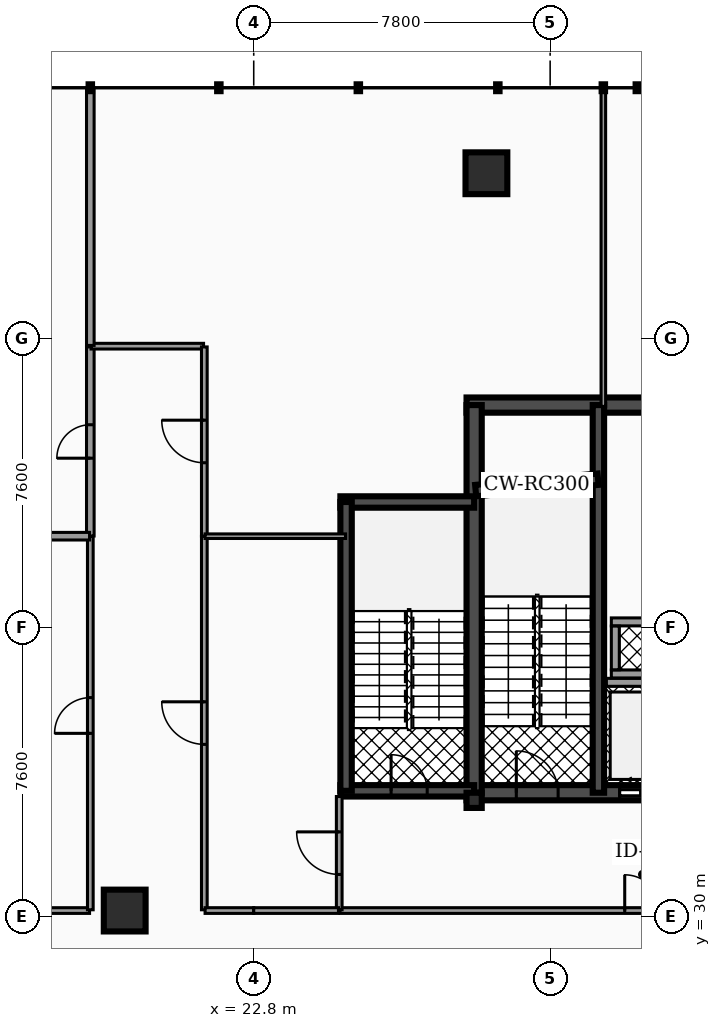
"""IFC4 building model, lengths in metres.
Left out: names, types, materials, properties, quantities, classifications, styles, units other than length and angle.
Written with IfcOpenShell. Run it as: python <this file> out.ifc"""

import sys

from ifc_helpers import new_model, si_unit, direction, frame, frame_2d, origin, origin_2d, place, context, subcontext, project, spatial, rectangle, hollow_rectangle, extrude, element, fill, save


model = new_model("IFC4")
c1 = context("Model", 3, precision=1e-05, world=origin(), true_north=direction((0.0, 1.0)))
c2 = subcontext(c1, "Body", "Model", "MODEL_VIEW")
j1 = project(units=[si_unit("LENGTHUNIT", "METRE"), si_unit("PLANEANGLEUNIT", "RADIAN")], contexts=[c1])
p1 = place(None, origin())
s1 = spatial("IfcSite", under=j1, at=p1, CompositionType="ELEMENT")
p2 = place(p1, origin())
s2 = spatial("IfcBuilding", under=s1, at=p2, CompositionType="ELEMENT")
p3 = place(p2, frame((0.0, 0.0, 13.94)))
s3 = spatial("IfcBuildingStorey", under=s2, at=p3, CompositionType="ELEMENT", Elevation=13.94)
p4 = place(p3, frame((28.4, 43.45, 0.0), z_axis=(0.0, 0.0, 1.0), x_axis=(1.0, 0.0, 0.0)))
e1 = element("IfcWall", 1, at=p4, inside=s3, PredefinedType="SHEAR", context=c2, shape_type="SweptSolid", body=[
    extrude(rectangle(XDim=20.06, YDim=0.4, at=frame_2d((10.03, 0.0))), origin(), (0.0, 0.0, 1.0), 4.14),
])
p5 = place(p3, frame((28.4, 33.25, 0.0), z_axis=(0.0, 0.0, 1.0), x_axis=(1.0, 0.0, 0.0)))
e2 = element("IfcWall", 2, at=p5, inside=s3, PredefinedType="SHEAR", context=c2, shape_type="SweptSolid", body=[
    extrude(rectangle(XDim=20.06, YDim=0.4, at=frame_2d((10.03, 0.0))), origin(), (0.0, 0.0, 1.0), 4.14),
])
p6 = place(p5, frame((4.03, 0.0, 0.0)))
e3 = element("IfcOpeningElement", 3, at=p6, cuts=e2, PredefinedType="OPENING", context=c2, shape_type="SweptSolid", body=[
    extrude(rectangle(XDim=1.1, YDim=2.15, at=frame_2d((0.55, 1.075))), frame((0.0, 0.21, 0.0), z_axis=(0.0, -1.0, 0.0), x_axis=(1.0, 0.0, 0.0)), (0.0, 0.0, 1.0), 0.42),
])
p7 = place(p5, frame((14.87, 0.0, 0.0)))
e4 = element("IfcOpeningElement", 4, at=p7, cuts=e2, PredefinedType="OPENING", context=c2, shape_type="SweptSolid", body=[
    extrude(rectangle(XDim=1.1, YDim=2.15, at=frame_2d((0.55, 1.075))), frame((0.0, 0.21, 0.0), z_axis=(0.0, -1.0, 0.0), x_axis=(1.0, 0.0, 0.0)), (0.0, 0.0, 1.0), 0.42),
])
p8 = place(p5, frame((1.31, 0.0, 0.0)))
e5 = element("IfcOpeningElement", 5, at=p8, cuts=e2, PredefinedType="OPENING", context=c2, shape_type="SweptSolid", body=[
    extrude(rectangle(XDim=1.1, YDim=2.2, at=frame_2d((0.55, 1.1))), frame((0.0, 0.21, 0.0), z_axis=(0.0, -1.0, 0.0), x_axis=(1.0, 0.0, 0.0)), (0.0, 0.0, 1.0), 0.42),
])
p9 = place(p5, frame((9.44, 0.0, 0.0)))
e6 = element("IfcOpeningElement", 6, at=p9, cuts=e2, PredefinedType="OPENING", context=c2, shape_type="SweptSolid", body=[
    extrude(rectangle(XDim=1.12, YDim=2.05, at=frame_2d((0.56, 1.025))), frame((0.0, 0.21, 0.0), z_axis=(0.0, -1.0, 0.0), x_axis=(1.0, 0.0, 0.0)), (0.0, 0.0, 1.0), 0.42),
])
p10 = place(p5, frame((17.65, 0.0, 0.0)))
e7 = element("IfcOpeningElement", 7, at=p10, cuts=e2, PredefinedType="OPENING", context=c2, shape_type="SweptSolid", body=[
    extrude(rectangle(XDim=1.1, YDim=2.2, at=frame_2d((0.55, 1.1))), frame((0.0, 0.21, 0.0), z_axis=(0.0, -1.0, 0.0), x_axis=(1.0, 0.0, 0.0)), (0.0, 0.0, 1.0), 0.42),
])
p11 = place(p3, frame((28.6, 33.25, 0.0), z_axis=(0.0, 0.0, 1.0), x_axis=(0.0, 1.0, 0.0)))
e8 = element("IfcWall", 8, at=p11, inside=s3, PredefinedType="SHEAR", context=c2, shape_type="SweptSolid", body=[
    extrude(rectangle(XDim=10.2, YDim=0.4, at=frame_2d((5.1, 0.0))), origin(), (0.0, 0.0, 1.0), 4.14),
])
p12 = place(p3, frame((31.87, 33.25, 0.0), z_axis=(0.0, 0.0, 1.0), x_axis=(0.0, 1.0, 0.0)))
e9 = element("IfcWall", 9, at=p12, inside=s3, PredefinedType="SHEAR", context=c2, shape_type="SweptSolid", body=[
    extrude(rectangle(XDim=10.2, YDim=0.3, at=frame_2d((5.1, 0.0))), origin(), (0.0, 0.0, 1.0), 4.14),
])
p13 = place(p3, frame((28.64, 41.2, 0.0), z_axis=(0.0, 0.0, 1.0), x_axis=(0.995687118776, 0.092774789157, 0.0)))
e10 = element("IfcWall", 10, at=p13, inside=s3, PredefinedType="SHEAR", context=c2, shape_type="SweptSolid", body=[
    extrude(rectangle(XDim=3.234, YDim=0.3, at=frame_2d((1.617, 0.0))), origin(), (0.0, 0.0, 1.0), 4.14),
])
p14 = place(p3, frame((25.08, 40.9, 0.0), z_axis=(0.0, 0.0, 1.0), x_axis=(1.0, 0.0, 0.0)))
e11 = element("IfcWall", 11, at=p14, inside=s3, PredefinedType="SHEAR", context=c2, shape_type="SweptSolid", body=[
    extrude(rectangle(XDim=3.52, YDim=0.3, at=frame_2d((1.76, 0.0))), origin(), (0.0, 0.0, 1.0), 4.14),
])
p15 = place(p3, frame((25.08, 33.3, 0.0), z_axis=(0.0, 0.0, 1.0), x_axis=(1.0, 0.0, 0.0)))
e12 = element("IfcWall", 12, at=p15, inside=s3, PredefinedType="SHEAR", context=c2, shape_type="SweptSolid", body=[
    extrude(rectangle(XDim=3.52, YDim=0.3, at=frame_2d((1.76, 0.0))), origin(), (0.0, 0.0, 1.0), 4.14),
])
p16 = place(p15, frame((1.335, 0.0, 0.0)))
e13 = element("IfcOpeningElement", 13, at=p16, cuts=e12, PredefinedType="OPENING", context=c2, shape_type="SweptSolid", body=[
    extrude(rectangle(XDim=0.95, YDim=2.2, at=frame_2d((0.475, 1.1))), frame((0.0, 0.16, 0.0), z_axis=(0.0, -1.0, 0.0), x_axis=(1.0, 0.0, 0.0)), (0.0, 0.0, 1.0), 0.32),
])
p17 = place(p3, frame((25.23, 33.3, 0.0), z_axis=(0.0, 0.0, 1.0), x_axis=(0.0, 1.0, 0.0)))
e14 = element("IfcWall", 14, at=p17, inside=s3, PredefinedType="SHEAR", context=c2, shape_type="SweptSolid", body=[
    extrude(rectangle(XDim=7.6, YDim=0.3, at=frame_2d((3.8, 0.0))), origin(), (0.0, 0.0, 1.0), 4.14),
])
for number, where, z_axis, x_axis in (
    (15, (28.923, 49.55, 0.0), (0.0, 0.0, 1.0), (1.0, 0.0, 0.0)),
    (16, (19.405, 30.15, 0.0), (0.0, 0.0, 1.0), (1.0, 0.0, 0.0)),
):
    element("IfcColumn", number, at=place(p3, frame(where, z_axis=z_axis, x_axis=x_axis)), inside=s3, PredefinedType="COLUMN", context=c2, shape_type="SweptSolid", body=[
        extrude(hollow_rectangle(XDim=1.1, YDim=1.1, WallThickness=0.055, at=origin_2d()), origin(), (0.0, 0.0, 1.0), 4.14),
    ])
p18 = place(p3, frame((28.6, 33.05, 0.0), z_axis=(0.0, 0.0, 1.0), x_axis=(1.0, 0.0, 0.0)))
e17 = element("IfcColumn", 17, at=p18, inside=s3, PredefinedType="PILASTER", context=c2, shape_type="SweptSolid", body=[
    extrude(hollow_rectangle(XDim=0.4, YDim=0.4, WallThickness=0.02, at=origin_2d()), origin(), (0.0, 0.0, 1.0), 4.14),
])
p19 = place(p3, frame((32.08, 36.155, 0.0), z_axis=(0.0, 0.0, 1.0), x_axis=(1.0, 0.0, 0.0)))
e18 = element("IfcWall", 18, at=p19, inside=s3, PredefinedType="SOLIDWALL", context=c2, shape_type="SweptSolid", body=[
    extrude(rectangle(XDim=1.8, YDim=0.21, at=frame_2d((0.9, 0.0))), origin(), (0.0, 0.0, 1.0), 3.112),
])
for number, where, z_axis, x_axis in (
    (19, (32.21, 36.375, 0.0), (0.0, 0.0, 1.0), (1.0, 0.0, 0.0)),
    (20, (32.21, 37.745, 0.0), (0.0, 0.0, 1.0), (1.0, 0.0, 0.0)),
):
    element("IfcWall", number, at=place(p3, frame(where, z_axis=z_axis, x_axis=x_axis)), inside=s3, PredefinedType="SOLIDWALL", context=c2, shape_type="SweptSolid", body=[
        extrude(rectangle(XDim=1.6, YDim=0.21, at=frame_2d((0.8, 0.0))), origin(), (0.0, 0.0, 1.0), 4.14),
    ])
p20 = place(p3, frame((32.315, 36.485, 0.0), z_axis=(0.0, 0.0, 1.0), x_axis=(0.0, 1.0, 0.0)))
e21 = element("IfcWall", 21, at=p20, inside=s3, PredefinedType="SOLIDWALL", context=c2, shape_type="SweptSolid", body=[
    extrude(rectangle(XDim=1.15, YDim=0.21, at=frame_2d((0.575, 0.0))), origin(), (0.0, 0.0, 1.0), 4.14),
])
p21 = place(p3, frame((25.07, 30.15, 0.0), z_axis=(0.0, 0.0, 1.0), x_axis=(1.0, 0.0, 0.0)))
e22 = element("IfcWall", 22, at=p21, inside=s3, PredefinedType="PARTITIONING", context=c2, shape_type="SweptSolid", body=[
    extrude(rectangle(XDim=20.325, YDim=0.15, at=frame_2d((10.163, 0.0))), origin(), (0.0, 0.0, 1.0), 3.097),
])
p22 = place(p21, frame((7.492, 0.0, 0.0)))
e23 = element("IfcOpeningElement", 23, at=p22, cuts=e22, PredefinedType="OPENING", context=c2, shape_type="SweptSolid", body=[
    extrude(rectangle(XDim=0.94, YDim=2.05, at=frame_2d((0.47, 1.025))), frame((0.0, 0.085, 0.0), z_axis=(0.0, -1.0, 0.0), x_axis=(1.0, 0.0, 0.0)), (0.0, 0.0, 1.0), 0.17),
])
p23 = place(p3, frame((25.05, 30.17, 0.0), z_axis=(0.0, 0.0, 1.0), x_axis=(0.0, 1.0, 0.0)))
e24 = element("IfcWall", 24, at=p23, inside=s3, PredefinedType="PARTITIONING", context=c2, shape_type="SweptSolid", body=[
    extrude(rectangle(XDim=2.98, YDim=0.15, at=frame_2d((1.49, 0.0))), origin(), (0.0, 0.0, 1.0), 3.097),
])
p24 = place(p23, frame((0.93, 0.0, 0.0)))
e25 = element("IfcOpeningElement", 25, at=p24, cuts=e24, PredefinedType="OPENING", context=c2, shape_type="SweptSolid", body=[
    extrude(rectangle(XDim=1.12, YDim=2.05, at=frame_2d((0.56, 1.025))), frame((0.0, 0.085, 0.0), z_axis=(0.0, -1.0, 0.0), x_axis=(1.0, 0.0, 0.0)), (0.0, 0.0, 1.0), 0.17),
])
p25 = place(p3, frame((11.52, 30.15, 0.0), z_axis=(0.0, 0.0, 1.0), x_axis=(1.0, 0.0, 0.0)))
e26 = element("IfcWall", 26, at=p25, inside=s3, PredefinedType="PARTITIONING", context=c2, shape_type="SweptSolid", body=[
    extrude(rectangle(XDim=6.96, YDim=0.15, at=frame_2d((3.48, 0.0))), origin(), (0.0, 0.0, 1.0), 3.097),
])
p26 = place(p3, frame((18.5, 30.17, 0.0), z_axis=(0.0, 0.0, 1.0), x_axis=(0.0, 1.0, 0.0)))
e27 = element("IfcWall", 27, at=p26, inside=s3, PredefinedType="PARTITIONING", context=c2, shape_type="SweptSolid", body=[
    extrude(rectangle(XDim=9.825, YDim=0.15, at=frame_2d((4.913, 0.0))), origin(), (0.0, 0.0, 1.0), 3.097),
])
p27 = place(p26, frame((4.643, 0.0, 0.0)))
e28 = element("IfcOpeningElement", 28, at=p27, cuts=e27, PredefinedType="OPENING", context=c2, shape_type="SweptSolid", body=[
    extrude(rectangle(XDim=0.94, YDim=2.05, at=frame_2d((0.47, 1.025))), frame((0.0, 0.085, 0.0), z_axis=(0.0, -1.0, 0.0), x_axis=(1.0, 0.0, 0.0)), (0.0, 0.0, 1.0), 0.17),
])
p28 = place(p3, frame((21.5, 30.17, 0.0), z_axis=(0.0, 0.0, 1.0), x_axis=(0.0, 1.0, 0.0)))
e29 = element("IfcWall", 29, at=p28, inside=s3, PredefinedType="PARTITIONING", context=c2, shape_type="SweptSolid", body=[
    extrude(rectangle(XDim=9.825, YDim=0.15, at=frame_2d((4.913, 0.0))), origin(), (0.0, 0.0, 1.0), 3.097),
])
p29 = place(p28, frame((4.353, 0.0, 0.0)))
e30 = element("IfcOpeningElement", 30, at=p29, cuts=e29, PredefinedType="OPENING", context=c2, shape_type="SweptSolid", body=[
    extrude(rectangle(XDim=1.12, YDim=2.05, at=frame_2d((0.56, 1.025))), frame((0.0, 0.085, 0.0), z_axis=(0.0, -1.0, 0.0), x_axis=(1.0, 0.0, 0.0)), (0.0, 0.0, 1.0), 0.17),
])
p30 = place(p3, frame((21.52, 30.15, 0.0), z_axis=(0.0, 0.0, 1.0), x_axis=(1.0, 0.0, 0.0)))
e31 = element("IfcWall", 31, at=p30, inside=s3, PredefinedType="PARTITIONING", context=c2, shape_type="SweptSolid", body=[
    extrude(rectangle(XDim=1.28, YDim=0.15, at=frame_2d((0.64, 0.0))), origin(), (0.0, 0.0, 1.0), 3.097),
])
p31 = place(p3, frame((22.8, 30.15, 0.0), z_axis=(0.0, 0.0, 1.0), x_axis=(1.0, 0.0, 0.0)))
e32 = element("IfcWall", 32, at=p31, inside=s3, PredefinedType="PARTITIONING", context=c2, shape_type="SweptSolid", body=[
    extrude(rectangle(XDim=2.23, YDim=0.15, at=frame_2d((1.115, 0.0))), origin(), (0.0, 0.0, 1.0), 3.097),
])
p32 = place(p3, frame((18.5, 40.005, 0.0), z_axis=(0.0, 0.0, 1.0), x_axis=(0.0, 1.0, 0.0)))
e33 = element("IfcWall", 33, at=p32, inside=s3, PredefinedType="PARTITIONING", context=c2, shape_type="SweptSolid", body=[
    extrude(rectangle(XDim=4.975, YDim=0.2, at=frame_2d((2.488, 0.0))), origin(), (0.0, 0.0, 1.0), 3.097),
])
p33 = place(p32, frame((2.048, 0.0, 0.0)))
e34 = element("IfcOpeningElement", 34, at=p33, cuts=e33, PredefinedType="OPENING", context=c2, shape_type="SweptSolid", body=[
    extrude(rectangle(XDim=0.88, YDim=2.05, at=frame_2d((0.44, 1.025))), frame((0.0, 0.11, 0.0), z_axis=(0.0, -1.0, 0.0), x_axis=(1.0, 0.0, 0.0)), (0.0, 0.0, 1.0), 0.22),
])
p34 = place(p3, frame((18.52, 45.0, 0.0), z_axis=(0.0, 0.0, 1.0), x_axis=(1.0, 0.0, 0.0)))
e35 = element("IfcWall", 35, at=p34, inside=s3, PredefinedType="PARTITIONING", context=c2, shape_type="SweptSolid", body=[
    extrude(rectangle(XDim=2.96, YDim=0.15, at=frame_2d((1.48, 0.0))), origin(), (0.0, 0.0, 1.0), 3.097),
])
p35 = place(p3, frame((21.5, 40.005, 0.0), z_axis=(0.0, 0.0, 1.0), x_axis=(0.0, 1.0, 0.0)))
e36 = element("IfcWall", 36, at=p35, inside=s3, PredefinedType="PARTITIONING", context=c2, shape_type="SweptSolid", body=[
    extrude(rectangle(XDim=4.975, YDim=0.15, at=frame_2d((2.488, 0.0))), origin(), (0.0, 0.0, 1.0), 3.097),
])
p36 = place(p35, frame((1.927, 0.0, 0.0)))
e37 = element("IfcOpeningElement", 37, at=p36, cuts=e36, PredefinedType="OPENING", context=c2, shape_type="SweptSolid", body=[
    extrude(rectangle(XDim=1.12, YDim=2.05, at=frame_2d((0.56, 1.025))), frame((0.0, 0.085, 0.0), z_axis=(0.0, -1.0, 0.0), x_axis=(1.0, 0.0, 0.0)), (0.0, 0.0, 1.0), 0.17),
])
p37 = place(p3, frame((32.0, 43.415, 0.0), z_axis=(0.0, 0.0, 1.0), x_axis=(0.0, 1.0, 0.0)))
e38 = element("IfcWall", 38, at=p37, inside=s3, PredefinedType="PARTITIONING", context=c2, shape_type="SweptSolid", body=[
    extrude(rectangle(XDim=8.37, YDim=0.12, at=frame_2d((4.185, 0.0))), origin(), (0.0, 0.0, 1.0), 3.097),
])
p38 = place(p3, frame((2.415, 40.0, 0.0), z_axis=(0.0, 0.0, 1.0), x_axis=(1.0, 0.0, 0.0)))
e39 = element("IfcWall", 39, at=p38, inside=s3, PredefinedType="PARTITIONING", context=c2, shape_type="SweptSolid", body=[
    extrude(rectangle(XDim=16.065, YDim=0.2, at=frame_2d((8.032, 0.0))), origin(), (0.0, 0.0, 1.0), 3.097),
])
p39 = place(p3, frame((21.52, 40.0, 0.0), z_axis=(0.0, 0.0, 1.0), x_axis=(1.0, 0.0, 0.0)))
e40 = element("IfcWall", 40, at=p39, inside=s3, PredefinedType="PARTITIONING", context=c2, shape_type="SweptSolid", body=[
    extrude(rectangle(XDim=3.695, YDim=0.12, at=frame_2d((1.848, 0.0))), origin(), (0.0, 0.0, 1.0), 3.097),
])
p40 = place(p3, frame((18.5, 45.02, 0.0), z_axis=(0.0, 0.0, 1.0), x_axis=(0.0, 1.0, 0.0)))
e41 = element("IfcWall", 41, at=p40, inside=s3, PredefinedType="PARTITIONING", context=c2, shape_type="SweptSolid", body=[
    extrude(rectangle(XDim=6.765, YDim=0.2, at=frame_2d((3.382, 0.0))), origin(), (0.0, 0.0, 1.0), 3.097),
])
p41 = place(p6, origin())
e42 = element("IfcDoor", 42, at=p41, inside=s3, OperationType="SLIDING_TO_LEFT", PredefinedType="DOOR", context=c2, shape_type="SweptSolid", body=[
    extrude(rectangle(XDim=1.1, YDim=2.15, at=frame_2d((0.55, 1.075))), frame((0.0, 0.025, 0.0), z_axis=(0.0, -1.0, 0.0), x_axis=(1.0, 0.0, 0.0)), (0.0, 0.0, 1.0), 0.05),
])
fill(e3, e42)
p42 = place(p8, origin())
e43 = element("IfcDoor", 43, at=p42, inside=s3, OperationType="SINGLE_SWING_LEFT", PredefinedType="DOOR", context=c2, shape_type="SweptSolid", body=[
    extrude(rectangle(XDim=1.1, YDim=2.2, at=frame_2d((0.55, 1.1))), frame((0.0, 0.025, 0.0), z_axis=(0.0, -1.0, 0.0), x_axis=(1.0, 0.0, 0.0)), (0.0, 0.0, 1.0), 0.05),
])
fill(e5, e43)
p43 = place(p16, origin())
e44 = element("IfcDoor", 44, at=p43, inside=s3, OperationType="SINGLE_SWING_LEFT", PredefinedType="DOOR", context=c2, shape_type="SweptSolid", body=[
    extrude(rectangle(XDim=0.95, YDim=2.2, at=frame_2d((0.475, 1.1))), frame((0.0, 0.025, 0.0), z_axis=(0.0, -1.0, 0.0), x_axis=(1.0, 0.0, 0.0)), (0.0, 0.0, 1.0), 0.05),
])
fill(e13, e44)
p44 = place(p22, origin())
e45 = element("IfcDoor", 45, at=p44, inside=s3, OperationType="SINGLE_SWING_LEFT", PredefinedType="DOOR", context=c2, shape_type="SweptSolid", body=[
    extrude(rectangle(XDim=0.94, YDim=2.05, at=frame_2d((0.47, 1.025))), frame((0.0, 0.025, 0.0), z_axis=(0.0, -1.0, 0.0), x_axis=(1.0, 0.0, 0.0)), (0.0, 0.0, 1.0), 0.05),
])
fill(e23, e45)
p45 = place(p24, origin())
e46 = element("IfcDoor", 46, at=p45, inside=s3, OperationType="SINGLE_SWING_RIGHT", PredefinedType="DOOR", context=c2, shape_type="SweptSolid", body=[
    extrude(rectangle(XDim=1.12, YDim=2.05, at=frame_2d((0.56, 1.025))), frame((0.0, 0.025, 0.0), z_axis=(0.0, -1.0, 0.0), x_axis=(1.0, 0.0, 0.0)), (0.0, 0.0, 1.0), 0.05),
])
fill(e25, e46)
p46 = place(p27, origin())
e47 = element("IfcDoor", 47, at=p46, inside=s3, OperationType="SINGLE_SWING_LEFT", PredefinedType="DOOR", context=c2, shape_type="SweptSolid", body=[
    extrude(rectangle(XDim=0.94, YDim=2.05, at=frame_2d((0.47, 1.025))), frame((0.0, 0.025, 0.0), z_axis=(0.0, -1.0, 0.0), x_axis=(1.0, 0.0, 0.0)), (0.0, 0.0, 1.0), 0.05),
])
fill(e28, e47)
p47 = place(p29, origin())
e48 = element("IfcDoor", 48, at=p47, inside=s3, OperationType="SINGLE_SWING_RIGHT", PredefinedType="DOOR", context=c2, shape_type="SweptSolid", body=[
    extrude(rectangle(XDim=1.12, YDim=2.05, at=frame_2d((0.56, 1.025))), frame((0.0, 0.025, 0.0), z_axis=(0.0, -1.0, 0.0), x_axis=(1.0, 0.0, 0.0)), (0.0, 0.0, 1.0), 0.05),
])
fill(e30, e48)
p48 = place(p33, origin())
e49 = element("IfcDoor", 49, at=p48, inside=s3, OperationType="SINGLE_SWING_LEFT", PredefinedType="DOOR", context=c2, shape_type="SweptSolid", body=[
    extrude(rectangle(XDim=0.88, YDim=2.05, at=frame_2d((0.44, 1.025))), frame((0.0, 0.025, 0.0), z_axis=(0.0, -1.0, 0.0), x_axis=(1.0, 0.0, 0.0)), (0.0, 0.0, 1.0), 0.05),
])
fill(e34, e49)
p49 = place(p36, origin())
e50 = element("IfcDoor", 50, at=p49, inside=s3, OperationType="SINGLE_SWING_RIGHT", PredefinedType="DOOR", context=c2, shape_type="SweptSolid", body=[
    extrude(rectangle(XDim=1.12, YDim=2.05, at=frame_2d((0.56, 1.025))), frame((0.0, 0.025, 0.0), z_axis=(0.0, -1.0, 0.0), x_axis=(1.0, 0.0, 0.0)), (0.0, 0.0, 1.0), 0.05),
])
fill(e37, e50)
save(model, sys.argv[1])
